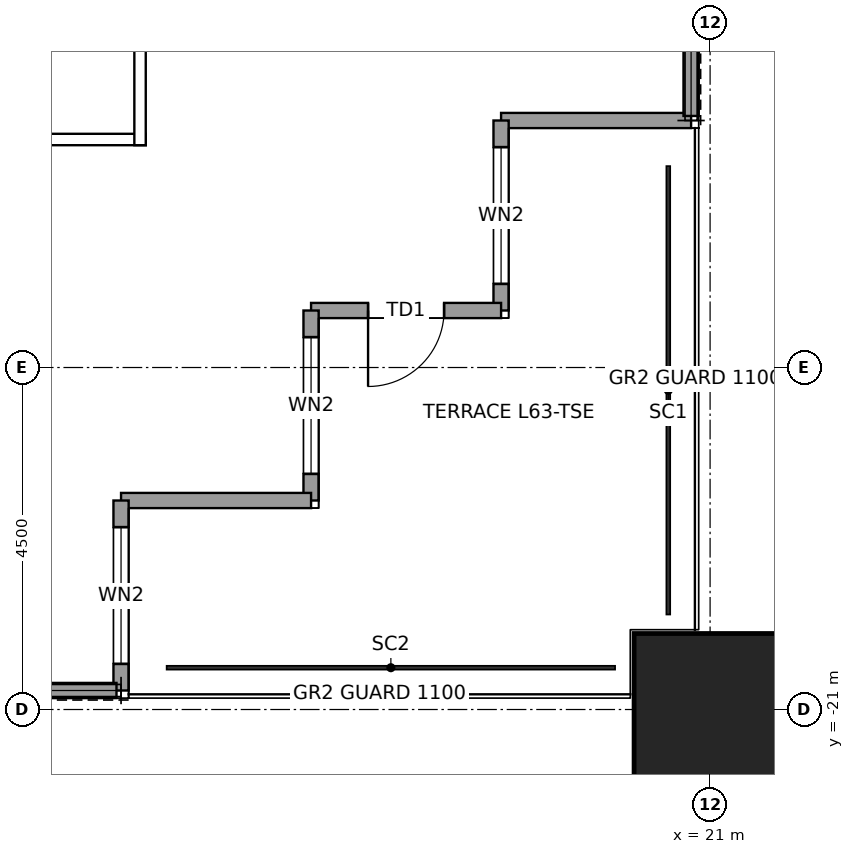
"""IFC4 building model, lengths in metres.
Left out: names, types, materials, properties, quantities, classifications, styles, units other than length and angle.
Written with IfcOpenShell. Run it as: python <this file> out.ifc"""

import sys

from ifc_helpers import new_model, si_unit, direction, frame, frame_2d, origin, origin_2d, place, context, subcontext, project, spatial, rectangle, hollow_rectangle, extrude, element, fill, save


model = new_model("IFC4")
c1 = context("Model", 3, precision=1e-05, world=origin(), true_north=direction((0.0, 1.0)))
c2 = subcontext(c1, "Body", "Model", "MODEL_VIEW")
j1 = project(units=[si_unit("LENGTHUNIT", "METRE"), si_unit("PLANEANGLEUNIT", "RADIAN")], contexts=[c1])
p1 = place(None, origin())
s1 = spatial("IfcSite", under=j1, at=p1, CompositionType="ELEMENT")
p2 = place(p1, origin())
s2 = spatial("IfcBuilding", under=s1, at=p2, CompositionType="ELEMENT")
p3 = place(p2, frame((0.0, 0.0, 287.9)))
s3 = spatial("IfcBuildingStorey", under=s2, at=p3, CompositionType="ELEMENT", Elevation=287.9)
p4 = place(p3, frame((21.0, -21.0, 0.0), z_axis=(0.0, 0.0, 1.0), x_axis=(1.0, 0.0, 0.0)))
e1 = element("IfcColumn", 1, at=p4, inside=s3, PredefinedType="COLUMN", context=c2, shape_type="SweptSolid", body=[
    extrude(hollow_rectangle(XDim=2.0, YDim=2.0, WallThickness=0.095, at=origin_2d()), origin(), (0.0, 0.0, 1.0), 4.0),
])
p5 = place(p3, frame((20.75, -13.25, 0.0), z_axis=(0.0, 0.0, 1.0), x_axis=(-1.0, 0.0, 0.0)))
e2 = element("IfcWall", 2, at=p5, inside=s3, PredefinedType="SOLIDWALL", context=c2, shape_type="SweptSolid", body=[
    extrude(rectangle(XDim=2.5, YDim=0.2, at=frame_2d((1.25, 0.0))), origin(), (0.0, 0.0, 1.0), 3.85),
])
p6 = place(p3, frame((18.25, -13.25, 0.0), z_axis=(0.0, 0.0, 1.0), x_axis=(0.0, -1.0, 0.0)))
e3 = element("IfcWall", 3, at=p6, inside=s3, PredefinedType="SOLIDWALL", context=c2, shape_type="SweptSolid", body=[
    extrude(rectangle(XDim=2.5, YDim=0.2, at=frame_2d((1.25, 0.0))), origin(), (0.0, 0.0, 1.0), 3.85),
])
p7 = place(p6, frame((0.35, 0.0, 0.3)))
e4 = element("IfcOpeningElement", 4, at=p7, cuts=e3, PredefinedType="OPENING", context=c2, shape_type="SweptSolid", body=[
    extrude(rectangle(XDim=1.8, YDim=2.4, at=frame_2d((0.9, 1.2))), frame((0.0, 0.11, 0.0), z_axis=(0.0, -1.0, 0.0), x_axis=(1.0, 0.0, 0.0)), (0.0, 0.0, 1.0), 0.22),
])
p8 = place(p3, frame((18.25, -15.75, 0.0), z_axis=(0.0, 0.0, 1.0), x_axis=(-1.0, 0.0, 0.0)))
e5 = element("IfcWall", 5, at=p8, inside=s3, PredefinedType="SOLIDWALL", context=c2, shape_type="SweptSolid", body=[
    extrude(rectangle(XDim=2.5, YDim=0.2, at=frame_2d((1.25, 0.0))), origin(), (0.0, 0.0, 1.0), 3.317),
])
p9 = place(p8, frame((0.75, 0.0, 0.0)))
e6 = element("IfcOpeningElement", 6, at=p9, cuts=e5, PredefinedType="OPENING", context=c2, shape_type="SweptSolid", body=[
    extrude(rectangle(XDim=1.0, YDim=2.4, at=frame_2d((0.5, 1.2))), frame((0.0, 0.11, 0.0), z_axis=(0.0, -1.0, 0.0), x_axis=(1.0, 0.0, 0.0)), (0.0, 0.0, 1.0), 0.22),
])
p10 = place(p3, frame((15.75, -15.75, 0.0), z_axis=(0.0, 0.0, 1.0), x_axis=(0.0, -1.0, 0.0)))
e7 = element("IfcWall", 7, at=p10, inside=s3, PredefinedType="SOLIDWALL", context=c2, shape_type="SweptSolid", body=[
    extrude(rectangle(XDim=2.5, YDim=0.2, at=frame_2d((1.25, 0.0))), origin(), (0.0, 0.0, 1.0), 3.85),
])
p11 = place(p10, frame((0.35, 0.0, 0.3)))
e8 = element("IfcOpeningElement", 8, at=p11, cuts=e7, PredefinedType="OPENING", context=c2, shape_type="SweptSolid", body=[
    extrude(rectangle(XDim=1.8, YDim=2.4, at=frame_2d((0.9, 1.2))), frame((0.0, 0.11, 0.0), z_axis=(0.0, -1.0, 0.0), x_axis=(1.0, 0.0, 0.0)), (0.0, 0.0, 1.0), 0.22),
])
p12 = place(p3, frame((15.75, -18.25, 0.0), z_axis=(0.0, 0.0, 1.0), x_axis=(-1.0, 0.0, 0.0)))
e9 = element("IfcWall", 9, at=p12, inside=s3, PredefinedType="SOLIDWALL", context=c2, shape_type="SweptSolid", body=[
    extrude(rectangle(XDim=2.5, YDim=0.2, at=frame_2d((1.25, 0.0))), origin(), (0.0, 0.0, 1.0), 3.85),
])
p13 = place(p3, frame((13.25, -18.25, 0.0), z_axis=(0.0, 0.0, 1.0), x_axis=(0.0, -1.0, 0.0)))
e10 = element("IfcWall", 10, at=p13, inside=s3, PredefinedType="SOLIDWALL", context=c2, shape_type="SweptSolid", body=[
    extrude(rectangle(XDim=2.5, YDim=0.2, at=frame_2d((1.25, 0.0))), origin(), (0.0, 0.0, 1.0), 3.85),
])
p14 = place(p13, frame((0.35, 0.0, 0.3)))
e11 = element("IfcOpeningElement", 11, at=p14, cuts=e10, PredefinedType="OPENING", context=c2, shape_type="SweptSolid", body=[
    extrude(rectangle(XDim=1.8, YDim=2.4, at=frame_2d((0.9, 1.2))), frame((0.0, 0.11, 0.0), z_axis=(0.0, -1.0, 0.0), x_axis=(1.0, 0.0, 0.0)), (0.0, 0.0, 1.0), 0.22),
])
for number, where, z_axis, x_axis in (
    (12, (20.75, -10.405, 0.0), (0.0, 0.0, 1.0), (0.0, -1.0, 0.0)),
    (13, (13.19, -20.75, 0.0), (0.0, 0.0, 1.0), (-1.0, 0.0, 0.0)),
):
    element("IfcWall", number, at=place(p3, frame(where, z_axis=z_axis, x_axis=x_axis)), inside=s3, PredefinedType="SOLIDWALL", context=c2, shape_type="SweptSolid", body=[
        extrude(rectangle(XDim=2.785, YDim=0.2, at=frame_2d((1.393, 0.0))), origin(), (0.0, 0.0, 1.0), 3.85),
    ])
p15 = place(p3, frame((-12.075, -13.5, 0.0), z_axis=(0.0, 0.0, 1.0), x_axis=(1.0, 0.0, 0.0)))
e14 = element("IfcWall", 14, at=p15, inside=s3, PredefinedType="PARTITIONING", context=c2, shape_type="SweptSolid", body=[
    extrude(rectangle(XDim=25.65, YDim=0.15, at=frame_2d((12.825, 0.0))), origin(), (0.0, 0.0, 1.0), 3.85),
])
p16 = place(p15, frame((3.075, 0.0, 0.0)))
e15 = element("IfcOpeningElement", 15, at=p16, cuts=e14, PredefinedType="OPENING", context=c2, shape_type="SweptSolid", body=[
    extrude(rectangle(XDim=1.0, YDim=2.4, at=frame_2d((0.5, 1.2))), frame((0.0, 0.085, 0.0), z_axis=(0.0, -1.0, 0.0), x_axis=(1.0, 0.0, 0.0)), (0.0, 0.0, 1.0), 0.17),
])
p17 = place(p3, frame((13.5, -13.575, 0.0), z_axis=(0.0, 0.0, 1.0), x_axis=(0.0, 1.0, 0.0)))
e16 = element("IfcWall", 16, at=p17, inside=s3, PredefinedType="PARTITIONING", context=c2, shape_type="SweptSolid", body=[
    extrude(rectangle(XDim=13.65, YDim=0.15, at=frame_2d((6.825, 0.0))), origin(), (0.0, 0.0, 1.0), 3.85),
])
p18 = place(p17, frame((3.825, 0.0, 0.0)))
e17 = element("IfcOpeningElement", 17, at=p18, cuts=e16, PredefinedType="OPENING", context=c2, shape_type="SweptSolid", body=[
    extrude(rectangle(XDim=1.0, YDim=2.4, at=frame_2d((0.5, 1.2))), frame((0.0, 0.085, 0.0), z_axis=(0.0, -1.0, 0.0), x_axis=(1.0, 0.0, 0.0)), (0.0, 0.0, 1.0), 0.17),
])
p19 = place(p7, origin())
e18 = element("IfcWindow", 18, at=p19, inside=s3, PartitioningType="SINGLE_PANEL", PredefinedType="WINDOW", context=c2, shape_type="SweptSolid", body=[
    extrude(rectangle(XDim=1.8, YDim=2.4, at=frame_2d((0.9, 1.2))), frame((0.0, 0.03, 0.0), z_axis=(0.0, -1.0, 0.0), x_axis=(1.0, 0.0, 0.0)), (0.0, 0.0, 1.0), 0.06),
])
fill(e4, e18)
p20 = place(p9, origin())
e19 = element("IfcDoor", 19, at=p20, inside=s3, OperationType="SINGLE_SWING_RIGHT", PredefinedType="DOOR", context=c2, shape_type="SweptSolid", body=[
    extrude(rectangle(XDim=1.0, YDim=2.4, at=frame_2d((0.5, 1.2))), frame((0.0, 0.025, 0.0), z_axis=(0.0, -1.0, 0.0), x_axis=(1.0, 0.0, 0.0)), (0.0, 0.0, 1.0), 0.05),
])
fill(e6, e19)
p21 = place(p11, origin())
e20 = element("IfcWindow", 20, at=p21, inside=s3, PartitioningType="SINGLE_PANEL", PredefinedType="WINDOW", context=c2, shape_type="SweptSolid", body=[
    extrude(rectangle(XDim=1.8, YDim=2.4, at=frame_2d((0.9, 1.2))), frame((0.0, 0.03, 0.0), z_axis=(0.0, -1.0, 0.0), x_axis=(1.0, 0.0, 0.0)), (0.0, 0.0, 1.0), 0.06),
])
fill(e8, e20)
p22 = place(p14, origin())
e21 = element("IfcWindow", 21, at=p22, inside=s3, PartitioningType="SINGLE_PANEL", PredefinedType="WINDOW", context=c2, shape_type="SweptSolid", body=[
    extrude(rectangle(XDim=1.8, YDim=2.4, at=frame_2d((0.9, 1.2))), frame((0.0, 0.03, 0.0), z_axis=(0.0, -1.0, 0.0), x_axis=(1.0, 0.0, 0.0)), (0.0, 0.0, 1.0), 0.06),
])
fill(e11, e21)
save(model, sys.argv[1])
